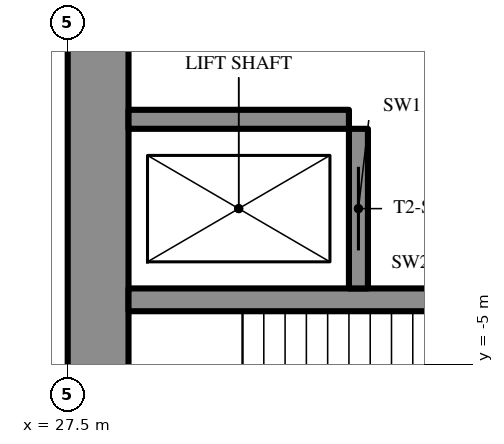
"""IFC4 building model, lengths in metres.
Left out: names, types, materials, properties, quantities, classifications, styles, units other than length and angle.
Written with IfcOpenShell. Run it as: python <this file> out.ifc"""

import sys

from ifc_helpers import new_model, si_unit, direction, frame, frame_2d, origin, place, context, subcontext, project, spatial, rectangle, extrude, element, fill, save


model = new_model("IFC4")
c1 = context("Model", 3, precision=1e-05, world=origin(), true_north=direction((0.0, 1.0)))
c2 = subcontext(c1, "Body", "Model", "MODEL_VIEW")
j1 = project(units=[si_unit("LENGTHUNIT", "METRE"), si_unit("PLANEANGLEUNIT", "RADIAN")], contexts=[c1])
p1 = place(None, origin())
s1 = spatial("IfcSite", under=j1, at=p1, CompositionType="ELEMENT")
p2 = place(p1, origin())
s2 = spatial("IfcBuilding", under=s1, at=p2, CompositionType="ELEMENT")
p3 = place(p2, frame((0.0, 0.0, 7.2)))
s3 = spatial("IfcBuildingStorey", under=s2, at=p3, CompositionType="ELEMENT", Elevation=7.2)
p4 = place(p3, frame((27.9, -8.6, 0.0), z_axis=(0.0, 0.0, 1.0), x_axis=(0.0, 1.0, 0.0)))
e1 = element("IfcWall", 1, at=p4, inside=s3, PredefinedType="SHEAR", context=c2, shape_type="SweptSolid", body=[
    extrude(rectangle(XDim=17.2, YDim=0.8, at=frame_2d((8.6, 0.0))), origin(), (0.0, 0.0, 1.0), 5.4),
])
p5 = place(p3, frame((28.3, -4.15, 0.0), z_axis=(0.0, 0.0, 1.0), x_axis=(1.0, 0.0, 0.0)))
e2 = element("IfcWall", 2, at=p5, inside=s3, PredefinedType="SHEAR", context=c2, shape_type="SweptSolid", body=[
    extrude(rectangle(XDim=8.4, YDim=0.3, at=frame_2d((4.2, 0.0))), origin(), (0.0, 0.0, 1.0), 5.4),
])
p6 = place(p3, frame((31.325, -4.0, 0.0), z_axis=(0.0, 0.0, 1.0), x_axis=(0.0, 1.0, 0.0)))
e3 = element("IfcWall", 3, at=p6, inside=s3, PredefinedType="SHEAR", context=c2, shape_type="SweptSolid", body=[
    extrude(rectangle(XDim=2.1, YDim=0.25, at=frame_2d((1.05, 0.0))), origin(), (0.0, 0.0, 1.0), 5.4),
])
p7 = place(p6, frame((0.5, 0.0, 0.0)))
e4 = element("IfcOpeningElement", 4, at=p7, cuts=e3, PredefinedType="OPENING", context=c2, shape_type="SweptSolid", body=[
    extrude(rectangle(XDim=1.1, YDim=2.2, at=frame_2d((0.55, 1.1))), frame((0.0, 0.135, 0.0), z_axis=(0.0, -1.0, 0.0), x_axis=(1.0, 0.0, 0.0)), (0.0, 0.0, 1.0), 0.27),
])
p8 = place(p3, frame((28.3, -1.775, 0.0), z_axis=(0.0, 0.0, 1.0), x_axis=(1.0, 0.0, 0.0)))
e5 = element("IfcWall", 5, at=p8, inside=s3, PredefinedType="SHEAR", context=c2, shape_type="SweptSolid", body=[
    extrude(rectangle(XDim=2.9, YDim=0.25, at=frame_2d((1.45, 0.0))), origin(), (0.0, 0.0, 1.0), 5.4),
])
p9 = place(p3, frame((27.2, -13.8, 0.0), z_axis=(0.0, 0.0, 1.0), x_axis=(0.866027159892, 0.499996958321, 0.0)))
e6 = element("IfcWall", 6, at=p9, inside=s3, PredefinedType="SHEAR", context=c2, shape_type="SweptSolid", body=[
    extrude(rectangle(XDim=27.947, YDim=2.0, at=frame_2d((13.973, 0.0))), origin(), (0.0, 0.0, 1.0), 5.4),
])
p10 = place(p9, frame((4.6, 0.0, 0.0)))
e7 = element("IfcOpeningElement", 7, at=p10, cuts=e6, PredefinedType="OPENING", context=c2, shape_type="SweptSolid", body=[
    extrude(rectangle(XDim=1.0, YDim=2.2, at=frame_2d((0.5, 1.1))), frame((0.0, 1.01, 0.0), z_axis=(0.0, -1.0, 0.0), x_axis=(1.0, 0.0, 0.0)), (0.0, 0.0, 1.0), 2.02),
])
p11 = place(p9, frame((13.395, 0.0, 0.0)))
e8 = element("IfcOpeningElement", 8, at=p11, cuts=e6, PredefinedType="OPENING", context=c2, shape_type="SweptSolid", body=[
    extrude(rectangle(XDim=1.8, YDim=2.2, at=frame_2d((0.9, 1.1))), frame((0.0, 1.01, 0.0), z_axis=(0.0, -1.0, 0.0), x_axis=(1.0, 0.0, 0.0)), (0.0, 0.0, 1.0), 2.02),
])
p12 = place(p7, origin())
e9 = element("IfcDoor", 9, at=p12, inside=s3, OperationType="SLIDING_TO_LEFT", PredefinedType="USERDEFINED", context=c2, shape_type="SweptSolid", body=[
    extrude(rectangle(XDim=1.1, YDim=2.2, at=frame_2d((0.55, 1.1))), frame((0.0, 0.025, 0.0), z_axis=(0.0, -1.0, 0.0), x_axis=(1.0, 0.0, 0.0)), (0.0, 0.0, 1.0), 0.05),
])
fill(e4, e9)
save(model, sys.argv[1])
